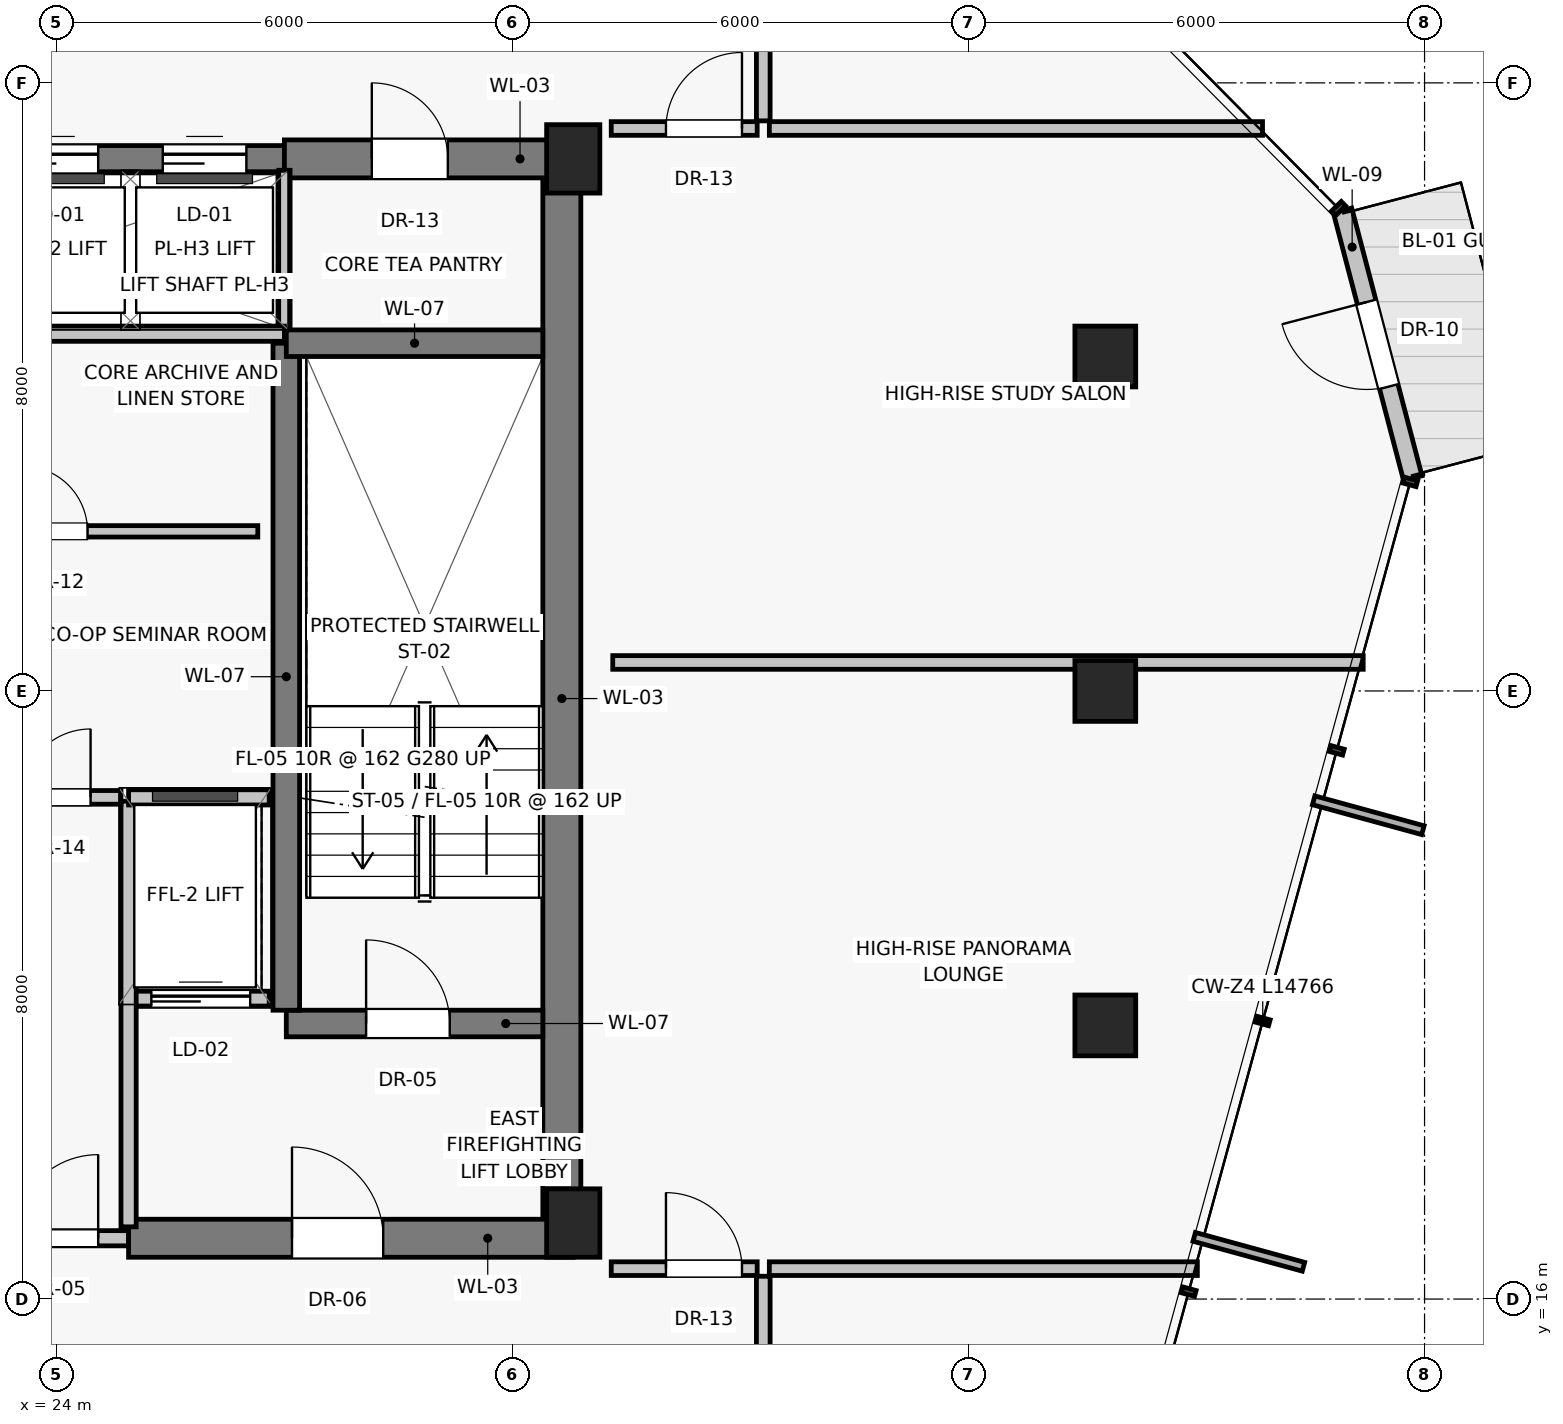
"""IFC4 building model, lengths in metres.
Left out: names, types, materials, properties, quantities, classifications, styles, units other than length and angle.
Written with IfcOpenShell. Run it as: python <this file> out.ifc"""

import sys

from ifc_helpers import new_model, si_unit, direction, frame, frame_2d, origin, origin_2d, place, context, subcontext, project, spatial, rectangle, extrude, source, transform, mapped, element, fill, save


model = new_model("IFC4")
c1 = context("Model", 3, precision=1e-05, world=origin(), true_north=direction((0.0, 1.0)))
c2 = subcontext(c1, "Body", "Model", "MODEL_VIEW")
j1 = project(units=[si_unit("LENGTHUNIT", "METRE"), si_unit("PLANEANGLEUNIT", "RADIAN")], contexts=[c1])
p1 = place(None, origin())
s1 = spatial("IfcSite", under=j1, at=p1, CompositionType="ELEMENT")
p2 = place(p1, origin())
s2 = spatial("IfcBuilding", under=s1, at=p2, CompositionType="ELEMENT")
p3 = place(p2, frame((0.0, 0.0, 261.0)))
s3 = spatial("IfcBuildingStorey", under=s2, at=p3, CompositionType="ELEMENT", Elevation=261.0)
for number, where, z_axis, x_axis in (
    (1, (30.8, 17.0, 0.0), (0.0, 0.0, 1.0), (1.0, 0.0, 0.0)),
    (2, (30.8, 31.0, 0.0), (0.0, 0.0, 1.0), (1.0, 0.0, 0.0)),
):
    element("IfcColumn", number, at=place(p3, frame(where, z_axis=z_axis, x_axis=x_axis)), inside=s3, PredefinedType="PILASTER", context=c2, shape_type="SweptSolid", body=[
        extrude(rectangle(XDim=0.7, YDim=0.9, at=origin_2d()), origin(), (0.0, 0.0, 1.0), 3.25),
    ])
for number, where, z_axis, x_axis in (
    (3, (37.8, 19.6, 0.0), (0.0, 0.0, 1.0), (1.0, 0.0, 0.0)),
    (4, (37.8, 24.0, 0.0), (0.0, 0.0, 1.0), (1.0, 0.0, 0.0)),
    (5, (37.8, 28.4, 0.0), (0.0, 0.0, 1.0), (1.0, 0.0, 0.0)),
):
    element("IfcColumn", number, at=place(p3, frame(where, z_axis=z_axis, x_axis=x_axis)), inside=s3, PredefinedType="COLUMN", context=c2, shape_type="SweptSolid", body=[
        extrude(rectangle(XDim=0.8, YDim=0.8, at=origin_2d()), origin(), (0.0, 0.0, 1.0), 3.25),
    ])
p4 = place(p3, frame((41.846, 26.799, 0.0), z_axis=(0.0, 0.0, 1.0), x_axis=(-0.253826800721, 0.967249686087, 0.0)))
e6 = element("IfcWall", 6, at=p4, inside=s3, PredefinedType="SOLIDWALL", context=c2, shape_type="SweptSolid", body=[
    extrude(rectangle(XDim=3.643, YDim=0.25, at=frame_2d((1.821, 0.0))), origin(), (0.0, 0.0, 1.0), 2.93),
])
p5 = place(p4, frame((1.246, 0.0, 0.0)))
e7 = element("IfcOpeningElement", 7, at=p5, cuts=e6, PredefinedType="OPENING", context=c2, shape_type="SweptSolid", body=[
    extrude(rectangle(XDim=1.15, YDim=2.25, at=frame_2d((0.575, 1.125))), frame((0.0, 0.135, 0.0), z_axis=(0.0, -1.0, 0.0), x_axis=(1.0, 0.0, 0.0)), (0.0, 0.0, 1.0), 0.27),
])
p6 = place(p3, frame((30.65, 16.8, 0.0), z_axis=(0.0, 0.0, 1.0), x_axis=(0.0, 1.0, 0.0)))
e8 = element("IfcWall", 8, at=p6, inside=s3, PredefinedType="SHEAR", context=c2, shape_type="SweptSolid", body=[
    extrude(rectangle(XDim=14.2, YDim=0.5, at=frame_2d((7.1, 0.0))), origin(), (0.0, 0.0, 1.0), 2.93),
])
p7 = place(p3, frame((23.05, 16.8, 0.0), z_axis=(0.0, 0.0, 1.0), x_axis=(1.0, 0.0, 0.0)))
e9 = element("IfcWall", 9, at=p7, inside=s3, PredefinedType="SOLIDWALL", context=c2, shape_type="SweptSolid", body=[
    extrude(rectangle(XDim=1.9, YDim=0.2, at=frame_2d((0.95, 0.0))), origin(), (0.0, 0.0, 1.0), 2.08),
])
p8 = place(p7, frame((0.4, 0.0, 0.0)))
e10 = element("IfcOpeningElement", 10, at=p8, cuts=e9, PredefinedType="OPENING", context=c2, shape_type="SweptSolid", body=[
    extrude(rectangle(XDim=1.1, YDim=2.03, at=frame_2d((0.55, 1.015))), frame((0.0, 0.11, 0.0), z_axis=(0.0, -1.0, 0.0), x_axis=(1.0, 0.0, 0.0)), (0.0, 0.0, 1.0), 0.22),
])
p9 = place(p3, frame((24.95, 16.8, 0.0), z_axis=(0.0, 0.0, 1.0), x_axis=(1.0, 0.0, 0.0)))
e11 = element("IfcWall", 11, at=p9, inside=s3, PredefinedType="SHEAR", context=c2, shape_type="SweptSolid", body=[
    extrude(rectangle(XDim=5.85, YDim=0.5, at=frame_2d((2.925, 0.0))), origin(), (0.0, 0.0, 1.0), 2.93),
])
p10 = place(p9, frame((2.15, 0.0, 0.0)))
e12 = element("IfcOpeningElement", 12, at=p10, cuts=e11, PredefinedType="OPENING", context=c2, shape_type="SweptSolid", body=[
    extrude(rectangle(XDim=1.2, YDim=2.03, at=frame_2d((0.6, 1.015))), frame((0.0, 0.26, 0.0), z_axis=(0.0, -1.0, 0.0), x_axis=(1.0, 0.0, 0.0)), (0.0, 0.0, 1.0), 0.52),
])
p11 = place(p3, frame((21.0, 31.0, 0.0), z_axis=(0.0, 0.0, 1.0), x_axis=(1.0, 0.0, 0.0)))
e13 = element("IfcWall", 13, at=p11, inside=s3, PredefinedType="SHEAR", context=c2, shape_type="SweptSolid", body=[
    extrude(rectangle(XDim=6.0, YDim=0.35, at=frame_2d((3.0, 0.0))), origin(), (0.0, 0.0, 1.0), 2.93),
])
p12 = place(p11, frame((0.5, 0.0, 0.0)))
e14 = element("IfcOpeningElement", 14, at=p12, cuts=e13, PredefinedType="OPENING", context=c2, shape_type="SweptSolid", body=[
    extrude(rectangle(XDim=1.1, YDim=2.08, at=frame_2d((0.55, 1.04))), frame((0.0, 0.185, 0.0), z_axis=(0.0, -1.0, 0.0), x_axis=(1.0, 0.0, 0.0)), (0.0, 0.0, 1.0), 0.37),
])
p13 = place(p11, frame((2.45, 0.0, 0.0)))
e15 = element("IfcOpeningElement", 15, at=p13, cuts=e13, PredefinedType="OPENING", context=c2, shape_type="SweptSolid", body=[
    extrude(rectangle(XDim=1.1, YDim=2.08, at=frame_2d((0.55, 1.04))), frame((0.0, 0.185, 0.0), z_axis=(0.0, -1.0, 0.0), x_axis=(1.0, 0.0, 0.0)), (0.0, 0.0, 1.0), 0.37),
])
p14 = place(p11, frame((4.4, 0.0, 0.0)))
e16 = element("IfcOpeningElement", 16, at=p14, cuts=e13, PredefinedType="OPENING", context=c2, shape_type="SweptSolid", body=[
    extrude(rectangle(XDim=1.1, YDim=2.08, at=frame_2d((0.55, 1.04))), frame((0.0, 0.185, 0.0), z_axis=(0.0, -1.0, 0.0), x_axis=(1.0, 0.0, 0.0)), (0.0, 0.0, 1.0), 0.37),
])
p15 = place(p3, frame((27.0, 31.0, 0.0), z_axis=(0.0, 0.0, 1.0), x_axis=(1.0, 0.0, 0.0)))
e17 = element("IfcWall", 17, at=p15, inside=s3, PredefinedType="SHEAR", context=c2, shape_type="SweptSolid", body=[
    extrude(rectangle(XDim=3.8, YDim=0.5, at=frame_2d((1.9, 0.0))), origin(), (0.0, 0.0, 1.0), 2.93),
])
p16 = place(p15, frame((1.15, 0.0, 0.0)))
e18 = element("IfcOpeningElement", 18, at=p16, cuts=e17, PredefinedType="OPENING", context=c2, shape_type="SweptSolid", body=[
    extrude(rectangle(XDim=1.0, YDim=2.01, at=frame_2d((0.5, 1.005))), frame((0.0, 0.26, 0.0), z_axis=(0.0, -1.0, 0.0), x_axis=(1.0, 0.0, 0.0)), (0.0, 0.0, 1.0), 0.52),
])
p17 = place(p3, frame((27.0, 28.65, 0.0), z_axis=(0.0, 0.0, 1.0), x_axis=(0.0, 1.0, 0.0)))
e19 = element("IfcWall", 19, at=p17, inside=s3, PredefinedType="PARTITIONING", context=c2, shape_type="SweptSolid", body=[
    extrude(rectangle(XDim=2.2, YDim=0.15, at=frame_2d((1.1, 0.0))), origin(), (0.0, 0.0, 1.0), 2.93),
])
p18 = place(p3, frame((24.95, 19.95, 0.0), z_axis=(0.0, 0.0, 1.0), x_axis=(1.0, 0.0, 0.0)))
e20 = element("IfcWall", 20, at=p18, inside=s3, PredefinedType="SOLIDWALL", context=c2, shape_type="SweptSolid", body=[
    extrude(rectangle(XDim=1.85, YDim=0.2, at=frame_2d((0.925, 0.0))), origin(), (0.0, 0.0, 1.0), 2.93),
])
p19 = place(p18, frame((0.3, 0.0, 0.0)))
e21 = element("IfcOpeningElement", 21, at=p19, cuts=e20, PredefinedType="OPENING", context=c2, shape_type="SweptSolid", body=[
    extrude(rectangle(XDim=1.3, YDim=2.25, at=frame_2d((0.65, 1.125))), frame((0.0, 0.11, 0.0), z_axis=(0.0, -1.0, 0.0), x_axis=(1.0, 0.0, 0.0)), (0.0, 0.0, 1.0), 0.22),
])
p20 = place(p3, frame((27.025, 19.625, 0.0), z_axis=(0.0, 0.0, 1.0), x_axis=(1.0, 0.0, 0.0)))
e22 = element("IfcWall", 22, at=p20, inside=s3, PredefinedType="SHEAR", context=c2, shape_type="SweptSolid", body=[
    extrude(rectangle(XDim=3.375, YDim=0.35, at=frame_2d((1.688, 0.0))), origin(), (0.0, 0.0, 1.0), 2.93),
])
p21 = place(p20, frame((1.05, 0.0, 0.0)))
e23 = element("IfcOpeningElement", 23, at=p21, cuts=e22, PredefinedType="OPENING", context=c2, shape_type="SweptSolid", body=[
    extrude(rectangle(XDim=1.1, YDim=2.03, at=frame_2d((0.55, 1.015))), frame((0.0, 0.185, 0.0), z_axis=(0.0, -1.0, 0.0), x_axis=(1.0, 0.0, 0.0)), (0.0, 0.0, 1.0), 0.37),
])
p22 = place(p3, frame((27.025, 19.8, 0.0), z_axis=(0.0, 0.0, 1.0), x_axis=(0.0, 1.0, 0.0)))
e24 = element("IfcWall", 24, at=p22, inside=s3, PredefinedType="SHEAR", context=c2, shape_type="SweptSolid", body=[
    extrude(rectangle(XDim=8.775, YDim=0.35, at=frame_2d((4.387, 0.0))), origin(), (0.0, 0.0, 1.0), 2.93),
])
p23 = place(p3, frame((27.025, 28.575, 0.0), z_axis=(0.0, 0.0, 1.0), x_axis=(1.0, 0.0, 0.0)))
e25 = element("IfcWall", 25, at=p23, inside=s3, PredefinedType="SHEAR", context=c2, shape_type="SweptSolid", body=[
    extrude(rectangle(XDim=3.375, YDim=0.35, at=frame_2d((1.688, 0.0))), origin(), (0.0, 0.0, 1.0), 2.93),
])
p24 = place(p3, frame((24.95, 16.95, 0.0), z_axis=(0.0, 0.0, 1.0), x_axis=(0.0, 1.0, 0.0)))
e26 = element("IfcWall", 26, at=p24, inside=s3, PredefinedType="SOLIDWALL", context=c2, shape_type="SweptSolid", body=[
    extrude(rectangle(XDim=5.6, YDim=0.2, at=frame_2d((2.8, 0.0))), origin(), (0.0, 0.0, 1.0), 2.93),
])
p25 = place(p3, frame((24.95, 22.6, 0.0), z_axis=(0.0, 0.0, 1.0), x_axis=(1.0, 0.0, 0.0)))
e27 = element("IfcWall", 27, at=p25, inside=s3, PredefinedType="SOLIDWALL", context=c2, shape_type="SweptSolid", body=[
    extrude(rectangle(XDim=1.85, YDim=0.2, at=frame_2d((0.925, 0.0))), origin(), (0.0, 0.0, 1.0), 2.93),
])
p26 = place(p3, frame((21.0, 28.7, 0.0), z_axis=(0.0, 0.0, 1.0), x_axis=(1.0, 0.0, 0.0)))
e28 = element("IfcWall", 28, at=p26, inside=s3, PredefinedType="SOLIDWALL", context=c2, shape_type="SweptSolid", body=[
    extrude(rectangle(XDim=6.0, YDim=0.2, at=frame_2d((3.0, 0.0))), origin(), (0.0, 0.0, 1.0), 2.93),
])
p27 = place(p3, frame((23.15, 22.6, 0.0), z_axis=(0.0, 0.0, 1.0), x_axis=(1.0, 0.0, 0.0)))
e29 = element("IfcWall", 29, at=p27, inside=s3, PredefinedType="PARTITIONING", context=c2, shape_type="SweptSolid", body=[
    extrude(rectangle(XDim=1.7, YDim=0.18, at=frame_2d((0.85, 0.0))), origin(), (0.0, 0.0, 1.0), 2.93),
])
p28 = place(p27, frame((0.4, 0.0, 0.0)))
e30 = element("IfcOpeningElement", 30, at=p28, cuts=e29, PredefinedType="OPENING", context=c2, shape_type="SweptSolid", body=[
    extrude(rectangle(XDim=0.9, YDim=2.01, at=frame_2d((0.45, 1.005))), frame((0.0, 0.1, 0.0), z_axis=(0.0, -1.0, 0.0), x_axis=(1.0, 0.0, 0.0)), (0.0, 0.0, 1.0), 0.2),
])
p29 = place(p3, frame((21.35, 26.1, 0.0), z_axis=(0.0, 0.0, 1.0), x_axis=(1.0, 0.0, 0.0)))
e31 = element("IfcWall", 31, at=p29, inside=s3, PredefinedType="PARTITIONING", context=c2, shape_type="SweptSolid", body=[
    extrude(rectangle(XDim=5.3, YDim=0.15, at=frame_2d((2.65, 0.0))), origin(), (0.0, 0.0, 1.0), 2.93),
])
p30 = place(p29, frame((2.2, 0.0, 0.0)))
e32 = element("IfcOpeningElement", 32, at=p30, cuts=e31, PredefinedType="OPENING", context=c2, shape_type="SweptSolid", body=[
    extrude(rectangle(XDim=0.86, YDim=2.01, at=frame_2d((0.43, 1.005))), frame((0.0, 0.085, 0.0), z_axis=(0.0, -1.0, 0.0), x_axis=(1.0, 0.0, 0.0)), (0.0, 0.0, 1.0), 0.17),
])
p31 = place(p3, frame((31.32, 24.375, 0.0), z_axis=(0.0, 0.0, 1.0), x_axis=(1.0, 0.0, 0.0)))
e33 = element("IfcWall", 33, at=p31, inside=s3, PredefinedType="PARTITIONING", context=c2, shape_type="SweptSolid", body=[
    extrude(rectangle(XDim=9.873, YDim=0.18, at=frame_2d((4.937, 0.0))), origin(), (0.0, 0.0, 1.0), 2.93),
])
p32 = place(p3, frame((33.3, 14.4, 0.0), z_axis=(0.0, 0.0, 1.0), x_axis=(0.0, 1.0, 0.0)))
e34 = element("IfcWall", 34, at=p32, inside=s3, PredefinedType="PARTITIONING", context=c2, shape_type="SweptSolid", body=[
    extrude(rectangle(XDim=1.9, YDim=0.18, at=frame_2d((0.95, 0.0))), origin(), (0.0, 0.0, 1.0), 2.93),
])
p33 = place(p3, frame((33.3, 31.5, 0.0), z_axis=(0.0, 0.0, 1.0), x_axis=(0.0, 1.0, 0.0)))
e35 = element("IfcWall", 35, at=p33, inside=s3, PredefinedType="PARTITIONING", context=c2, shape_type="SweptSolid", body=[
    extrude(rectangle(XDim=1.9, YDim=0.18, at=frame_2d((0.95, 0.0))), origin(), (0.0, 0.0, 1.0), 2.93),
])
p34 = place(p3, frame((31.3, 16.4, 0.0), z_axis=(0.0, 0.0, 1.0), x_axis=(1.0, 0.0, 0.0)))
e36 = element("IfcWall", 36, at=p34, inside=s3, PredefinedType="PARTITIONING", context=c2, shape_type="SweptSolid", body=[
    extrude(rectangle(XDim=1.92, YDim=0.18, at=frame_2d((0.96, 0.0))), origin(), (0.0, 0.0, 1.0), 2.93),
])
p35 = place(p34, frame((0.72, 0.0, 0.0)))
e37 = element("IfcOpeningElement", 37, at=p35, cuts=e36, PredefinedType="OPENING", context=c2, shape_type="SweptSolid", body=[
    extrude(rectangle(XDim=1.0, YDim=2.01, at=frame_2d((0.5, 1.005))), frame((0.0, 0.1, 0.0), z_axis=(0.0, -1.0, 0.0), x_axis=(1.0, 0.0, 0.0)), (0.0, 0.0, 1.0), 0.2),
])
p36 = place(p3, frame((33.38, 16.4, 0.0), z_axis=(0.0, 0.0, 1.0), x_axis=(1.0, 0.0, 0.0)))
e38 = element("IfcWall", 38, at=p36, inside=s3, PredefinedType="PARTITIONING", context=c2, shape_type="SweptSolid", body=[
    extrude(rectangle(XDim=5.631, YDim=0.18, at=frame_2d((2.815, 0.0))), origin(), (0.0, 0.0, 1.0), 2.93),
])
p37 = place(p3, frame((31.3, 31.4, 0.0), z_axis=(0.0, 0.0, 1.0), x_axis=(1.0, 0.0, 0.0)))
e39 = element("IfcWall", 39, at=p37, inside=s3, PredefinedType="PARTITIONING", context=c2, shape_type="SweptSolid", body=[
    extrude(rectangle(XDim=1.92, YDim=0.18, at=frame_2d((0.96, 0.0))), origin(), (0.0, 0.0, 1.0), 2.93),
])
p38 = place(p37, frame((0.72, 0.0, 0.0)))
e40 = element("IfcOpeningElement", 40, at=p38, cuts=e39, PredefinedType="OPENING", context=c2, shape_type="SweptSolid", body=[
    extrude(rectangle(XDim=1.0, YDim=2.01, at=frame_2d((0.5, 1.005))), frame((0.0, 0.1, 0.0), z_axis=(0.0, -1.0, 0.0), x_axis=(1.0, 0.0, 0.0)), (0.0, 0.0, 1.0), 0.2),
])
p39 = place(p3, frame((33.38, 31.4, 0.0), z_axis=(0.0, 0.0, 1.0), x_axis=(1.0, 0.0, 0.0)))
e41 = element("IfcWall", 41, at=p39, inside=s3, PredefinedType="PARTITIONING", context=c2, shape_type="SweptSolid", body=[
    extrude(rectangle(XDim=6.489, YDim=0.18, at=frame_2d((3.244, 0.0))), origin(), (0.0, 0.0, 1.0), 2.93),
])
m1 = source(origin(), c2, "Body", "SweptSolid", [
    extrude(rectangle(XDim=1.15, YDim=2.25, at=frame_2d((0.575, 1.125))), frame((0.0, 0.025, 0.0), z_axis=(0.0, -1.0, 0.0), x_axis=(1.0, 0.0, 0.0)), (0.0, 0.0, 1.0), 0.05),
])
p40 = place(p5, frame((1.15, 0.0, 0.0), z_axis=(0.0, 0.0, 1.0), x_axis=(-1.0, 0.0, 0.0)))
e42 = element("IfcDoor", 42, at=p40, inside=s3, OperationType="SINGLE_SWING_RIGHT", PredefinedType="DOOR", context=c2, shape_type="MappedRepresentation", body=[
    mapped(m1, transform((0.0, 0.0, 0.0), scale=1.0)),
])
fill(e7, e42)
m2 = source(origin(), c2, "Body", "SweptSolid", [
    extrude(rectangle(XDim=1.1, YDim=2.03, at=frame_2d((0.55, 1.015))), frame((0.0, 0.025, 0.0), z_axis=(0.0, -1.0, 0.0), x_axis=(1.0, 0.0, 0.0)), (0.0, 0.0, 1.0), 0.05),
])
p41 = place(p8, origin())
e43 = element("IfcDoor", 43, at=p41, inside=s3, OperationType="SINGLE_SWING_RIGHT", PredefinedType="DOOR", context=c2, shape_type="MappedRepresentation", body=[
    mapped(m2, transform((0.0, 0.0, 0.0), scale=1.0)),
])
fill(e10, e43)
m3 = source(origin(), c2, "Body", "SweptSolid", [
    extrude(rectangle(XDim=1.2, YDim=2.03, at=frame_2d((0.6, 1.015))), frame((0.0, 0.025, 0.0), z_axis=(0.0, -1.0, 0.0), x_axis=(1.0, 0.0, 0.0)), (0.0, 0.0, 1.0), 0.05),
])
p42 = place(p10, origin())
e44 = element("IfcDoor", 44, at=p42, inside=s3, OperationType="SINGLE_SWING_LEFT", PredefinedType="DOOR", context=c2, shape_type="MappedRepresentation", body=[
    mapped(m3, transform((0.0, 0.0, 0.0), scale=1.0)),
])
fill(e12, e44)
m4 = source(origin(), c2, "Body", "SweptSolid", [
    extrude(rectangle(XDim=1.1, YDim=2.08, at=frame_2d((0.55, 1.04))), frame((0.0, 0.025, 0.0), z_axis=(0.0, -1.0, 0.0), x_axis=(1.0, 0.0, 0.0)), (0.0, 0.0, 1.0), 0.05),
])
p43 = place(p13, origin())
e45 = element("IfcDoor", 45, at=p43, inside=s3, OperationType="SLIDING_TO_LEFT", PredefinedType="DOOR", context=c2, shape_type="MappedRepresentation", body=[
    mapped(m4, transform((0.0, 0.0, 0.0), scale=1.0)),
])
fill(e15, e45)
p44 = place(p14, origin())
e46 = element("IfcDoor", 46, at=p44, inside=s3, OperationType="SLIDING_TO_LEFT", PredefinedType="DOOR", context=c2, shape_type="MappedRepresentation", body=[
    mapped(m4, transform((0.0, 0.0, 0.0), scale=1.0)),
])
fill(e16, e46)
m5 = source(origin(), c2, "Body", "SweptSolid", [
    extrude(rectangle(XDim=1.0, YDim=2.01, at=frame_2d((0.5, 1.005))), frame((0.0, 0.025, 0.0), z_axis=(0.0, -1.0, 0.0), x_axis=(1.0, 0.0, 0.0)), (0.0, 0.0, 1.0), 0.05),
])
p45 = place(p16, origin())
e47 = element("IfcDoor", 47, at=p45, inside=s3, OperationType="SINGLE_SWING_LEFT", PredefinedType="DOOR", context=c2, shape_type="MappedRepresentation", body=[
    mapped(m5, transform((0.0, 0.0, 0.0), scale=1.0)),
])
fill(e18, e47)
m6 = source(origin(), c2, "Body", "SweptSolid", [
    extrude(rectangle(XDim=1.3, YDim=2.25, at=frame_2d((0.65, 1.125))), frame((0.0, 0.025, 0.0), z_axis=(0.0, -1.0, 0.0), x_axis=(1.0, 0.0, 0.0)), (0.0, 0.0, 1.0), 0.05),
])
p46 = place(p19, origin())
e48 = element("IfcDoor", 48, at=p46, inside=s3, OperationType="SLIDING_TO_LEFT", PredefinedType="DOOR", context=c2, shape_type="MappedRepresentation", body=[
    mapped(m6, transform((0.0, 0.0, 0.0), scale=1.0)),
])
fill(e21, e48)
p47 = place(p21, origin())
e49 = element("IfcDoor", 49, at=p47, inside=s3, OperationType="SINGLE_SWING_LEFT", PredefinedType="DOOR", context=c2, shape_type="MappedRepresentation", body=[
    mapped(m2, transform((0.0, 0.0, 0.0), scale=1.0)),
])
fill(e23, e49)
m7 = source(origin(), c2, "Body", "SweptSolid", [
    extrude(rectangle(XDim=0.9, YDim=2.01, at=frame_2d((0.45, 1.005))), frame((0.0, 0.025, 0.0), z_axis=(0.0, -1.0, 0.0), x_axis=(1.0, 0.0, 0.0)), (0.0, 0.0, 1.0), 0.05),
])
p48 = place(p28, origin())
e50 = element("IfcDoor", 50, at=p48, inside=s3, OperationType="SINGLE_SWING_RIGHT", PredefinedType="DOOR", context=c2, shape_type="MappedRepresentation", body=[
    mapped(m7, transform((0.0, 0.0, 0.0), scale=1.0)),
])
fill(e30, e50)
m8 = source(origin(), c2, "Body", "SweptSolid", [
    extrude(rectangle(XDim=0.86, YDim=2.01, at=frame_2d((0.43, 1.005))), frame((0.0, 0.025, 0.0), z_axis=(0.0, -1.0, 0.0), x_axis=(1.0, 0.0, 0.0)), (0.0, 0.0, 1.0), 0.05),
])
p49 = place(p30, origin())
e51 = element("IfcDoor", 51, at=p49, inside=s3, OperationType="SINGLE_SWING_LEFT", PredefinedType="DOOR", context=c2, shape_type="MappedRepresentation", body=[
    mapped(m8, transform((0.0, 0.0, 0.0), scale=1.0)),
])
fill(e32, e51)
p50 = place(p35, origin())
e52 = element("IfcDoor", 52, at=p50, inside=s3, OperationType="SINGLE_SWING_LEFT", PredefinedType="DOOR", context=c2, shape_type="MappedRepresentation", body=[
    mapped(m5, transform((0.0, 0.0, 0.0), scale=1.0)),
])
fill(e37, e52)
p51 = place(p38, origin())
e53 = element("IfcDoor", 53, at=p51, inside=s3, OperationType="SINGLE_SWING_RIGHT", PredefinedType="DOOR", context=c2, shape_type="MappedRepresentation", body=[
    mapped(m5, transform((0.0, 0.0, 0.0), scale=1.0)),
])
fill(e40, e53)
save(model, sys.argv[1])
